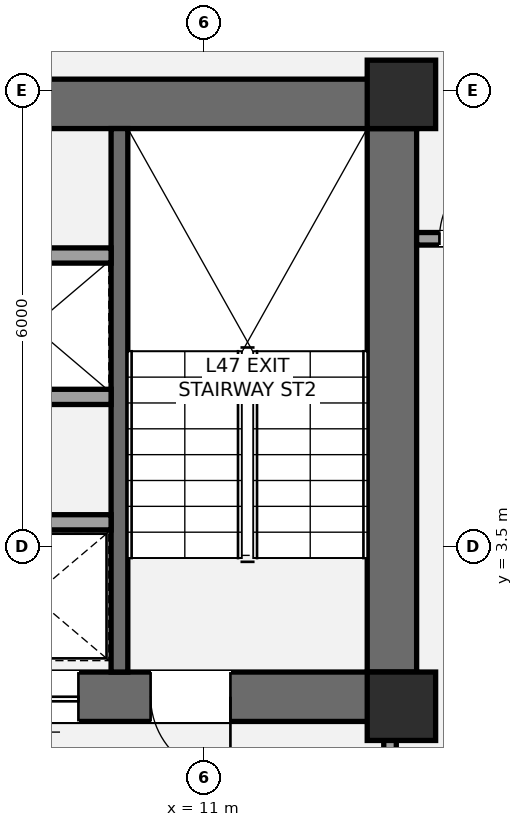
"""IFC4 building model, lengths in metres.
Left out: names, types, materials, properties, quantities, classifications, styles, units other than length and angle.
Written with IfcOpenShell. Run it as: python <this file> out.ifc"""

import sys

from ifc_helpers import new_model, si_unit, direction, frame, frame_2d, origin, origin_2d, place, context, subcontext, project, spatial, rectangle, extrude, element, fill, save


model = new_model("IFC4")
c1 = context("Model", 3, precision=1e-05, world=origin(), true_north=direction((0.0, 1.0)))
c2 = subcontext(c1, "Body", "Model", "MODEL_VIEW")
j1 = project(units=[si_unit("LENGTHUNIT", "METRE"), si_unit("PLANEANGLEUNIT", "RADIAN")], contexts=[c1])
p1 = place(None, origin())
s1 = spatial("IfcSite", under=j1, at=p1, CompositionType="ELEMENT")
p2 = place(p1, origin())
s2 = spatial("IfcBuilding", under=s1, at=p2, CompositionType="ELEMENT")
p3 = place(p2, frame((0.0, 0.0, 172.6)))
s3 = spatial("IfcBuildingStorey", under=s2, at=p3, CompositionType="ELEMENT", Elevation=172.6)
p4 = place(p3, frame((13.475, 1.2, 0.0), z_axis=(0.0, 0.0, 1.0), x_axis=(0.0, 1.0, 0.0)))
e1 = element("IfcWall", 1, at=p4, inside=s3, PredefinedType="SHEAR", context=c2, shape_type="SweptSolid", body=[
    extrude(rectangle(XDim=8.45, YDim=0.65, at=frame_2d((4.225, 0.0))), origin(), (0.0, 0.0, 1.0), 3.2),
])
p5 = place(p3, frame((4.475, 9.325, 0.0), z_axis=(0.0, 0.0, 1.0), x_axis=(1.0, 0.0, 0.0)))
e2 = element("IfcWall", 2, at=p5, inside=s3, PredefinedType="SHEAR", context=c2, shape_type="SweptSolid", body=[
    extrude(rectangle(XDim=9.325, YDim=0.65, at=frame_2d((4.663, 0.0))), origin(), (0.0, 0.0, 1.0), 3.2),
])
p6 = place(p3, frame((13.8, 1.525, 0.0), z_axis=(0.0, 0.0, 1.0), x_axis=(-1.0, 0.0, 0.0)))
e3 = element("IfcWall", 3, at=p6, inside=s3, PredefinedType="SHEAR", context=c2, shape_type="SweptSolid", body=[
    extrude(rectangle(XDim=8.925, YDim=0.65, at=frame_2d((4.462, 0.0))), origin(), (0.0, 0.0, 1.0), 3.2),
])
p7 = place(p6, frame((2.45, 0.0, 0.0)))
e4 = element("IfcOpeningElement", 4, at=p7, cuts=e3, PredefinedType="OPENING", context=c2, shape_type="SweptSolid", body=[
    extrude(rectangle(XDim=1.05, YDim=2.15, at=frame_2d((0.525, 1.075))), frame((0.0, 0.335, 0.0), z_axis=(0.0, -1.0, 0.0), x_axis=(1.0, 0.0, 0.0)), (0.0, 0.0, 1.0), 0.67),
])
p8 = place(p6, frame((4.45, 0.0, 0.0)))
e5 = element("IfcOpeningElement", 5, at=p8, cuts=e3, PredefinedType="OPENING", context=c2, shape_type="SweptSolid", body=[
    extrude(rectangle(XDim=1.1, YDim=2.2, at=frame_2d((0.55, 1.1))), frame((0.0, 0.335, 0.0), z_axis=(0.0, -1.0, 0.0), x_axis=(1.0, 0.0, 0.0)), (0.0, 0.0, 1.0), 0.67),
])
p9 = place(p3, frame((9.89, 1.85, 0.0), z_axis=(0.0, 0.0, 1.0), x_axis=(0.0, 1.0, 0.0)))
e6 = element("IfcWall", 6, at=p9, inside=s3, PredefinedType="SHEAR", context=c2, shape_type="SweptSolid", body=[
    extrude(rectangle(XDim=7.15, YDim=0.22, at=frame_2d((3.575, 0.0))), origin(), (0.0, 0.0, 1.0), 3.2),
])
for number, where, z_axis, x_axis in (
    (7, (13.6, 1.4, 0.0), (0.0, 0.0, 1.0), (1.0, 0.0, 0.0)),
    (8, (13.6, 9.45, 0.0), (0.0, 0.0, 1.0), (1.0, 0.0, 0.0)),
):
    element("IfcColumn", number, at=place(p3, frame(where, z_axis=z_axis, x_axis=x_axis)), inside=s3, PredefinedType="COLUMN", context=c2, shape_type="SweptSolid", body=[
        extrude(rectangle(XDim=0.9, YDim=0.9, at=origin_2d()), origin(), (0.0, 0.0, 1.0), 3.2),
    ])
p10 = place(p3, frame((13.45, -2.15, 0.0), z_axis=(0.0, 0.0, 1.0), x_axis=(0.0, 1.0, 0.0)))
e9 = element("IfcWall", 9, at=p10, inside=s3, PredefinedType="PARTITIONING", context=c2, shape_type="SweptSolid", body=[
    extrude(rectangle(XDim=3.4, YDim=0.165, at=frame_2d((1.7, 0.0))), origin(), (0.0, 0.0, 1.0), 2.473),
])
p11 = place(p10, frame((1.15, 0.0, 0.0)))
e10 = element("IfcOpeningElement", 10, at=p11, cuts=e9, PredefinedType="OPENING", context=c2, shape_type="SweptSolid", body=[
    extrude(rectangle(XDim=1.05, YDim=2.15, at=frame_2d((0.525, 1.075))), frame((0.0, 0.093, 0.0), z_axis=(0.0, -1.0, 0.0), x_axis=(1.0, 0.0, 0.0)), (0.0, 0.0, 1.0), 0.185),
])
p12 = place(p3, frame((5.525, 3.82, 0.0), z_axis=(0.0, 0.0, 1.0), x_axis=(1.0, 0.0, 0.0)))
e11 = element("IfcWall", 11, at=p12, inside=s3, PredefinedType="SOLIDWALL", context=c2, shape_type="SweptSolid", body=[
    extrude(rectangle(XDim=4.255, YDim=0.2, at=frame_2d((2.127, 0.0))), origin(), (0.0, 0.0, 1.0), 3.02),
])
p13 = place(p12, frame((0.65, 0.0, 0.0)))
e12 = element("IfcOpeningElement", 12, at=p13, cuts=e11, PredefinedType="OPENING", context=c2, shape_type="SweptSolid", body=[
    extrude(rectangle(XDim=1.2, YDim=2.2, at=frame_2d((0.6, 1.1))), frame((0.0, 0.11, 0.0), z_axis=(0.0, -1.0, 0.0), x_axis=(1.0, 0.0, 0.0)), (0.0, 0.0, 1.0), 0.22),
])
for number, where, z_axis, x_axis in (
    (13, (5.525, 5.47, 0.0), (0.0, 0.0, 1.0), (1.0, 0.0, 0.0)),
    (14, (5.525, 7.33, 0.0), (0.0, 0.0, 1.0), (1.0, 0.0, 0.0)),
):
    element("IfcWall", number, at=place(p3, frame(where, z_axis=z_axis, x_axis=x_axis)), inside=s3, PredefinedType="SOLIDWALL", context=c2, shape_type="SweptSolid", body=[
        extrude(rectangle(XDim=4.255, YDim=0.2, at=frame_2d((2.127, 0.0))), origin(), (0.0, 0.0, 1.0), 3.02),
    ])
p14 = place(p3, frame((13.8, 7.55, 0.0), z_axis=(0.0, 0.0, 1.0), x_axis=(1.0, 0.0, 0.0)))
e15 = element("IfcWall", 15, at=p14, inside=s3, PredefinedType="PARTITIONING", context=c2, shape_type="SweptSolid", body=[
    extrude(rectangle(XDim=2.3, YDim=0.165, at=frame_2d((1.15, 0.0))), origin(), (0.0, 0.0, 1.0), 3.02),
])
p15 = place(p14, frame((0.3, 0.0, 0.0)))
e16 = element("IfcOpeningElement", 16, at=p15, cuts=e15, PredefinedType="OPENING", context=c2, shape_type="SweptSolid", body=[
    extrude(rectangle(XDim=1.0, YDim=2.15, at=frame_2d((0.5, 1.075))), frame((0.0, 0.093, 0.0), z_axis=(0.0, -1.0, 0.0), x_axis=(1.0, 0.0, 0.0)), (0.0, 0.0, 1.0), 0.185),
])
p16 = place(p7, origin())
e17 = element("IfcDoor", 17, at=p16, inside=s3, OperationType="SINGLE_SWING_LEFT", PredefinedType="DOOR", context=c2, shape_type="SweptSolid", body=[
    extrude(rectangle(XDim=1.05, YDim=2.15, at=frame_2d((0.525, 1.075))), frame((0.0, 0.025, 0.0), z_axis=(0.0, -1.0, 0.0), x_axis=(1.0, 0.0, 0.0)), (0.0, 0.0, 1.0), 0.05),
])
fill(e4, e17)
p17 = place(p8, origin())
e18 = element("IfcDoor", 18, at=p17, inside=s3, OperationType="SLIDING_TO_LEFT", PredefinedType="DOOR", context=c2, shape_type="SweptSolid", body=[
    extrude(rectangle(XDim=1.1, YDim=2.2, at=frame_2d((0.55, 1.1))), frame((0.0, 0.025, 0.0), z_axis=(0.0, -1.0, 0.0), x_axis=(1.0, 0.0, 0.0)), (0.0, 0.0, 1.0), 0.05),
])
fill(e5, e18)
p18 = place(p15, origin())
e19 = element("IfcDoor", 19, at=p18, inside=s3, OperationType="SINGLE_SWING_RIGHT", PredefinedType="DOOR", context=c2, shape_type="SweptSolid", body=[
    extrude(rectangle(XDim=1.0, YDim=2.15, at=frame_2d((0.5, 1.075))), frame((0.0, 0.025, 0.0), z_axis=(0.0, -1.0, 0.0), x_axis=(1.0, 0.0, 0.0)), (0.0, 0.0, 1.0), 0.05),
])
fill(e16, e19)
save(model, sys.argv[1])
